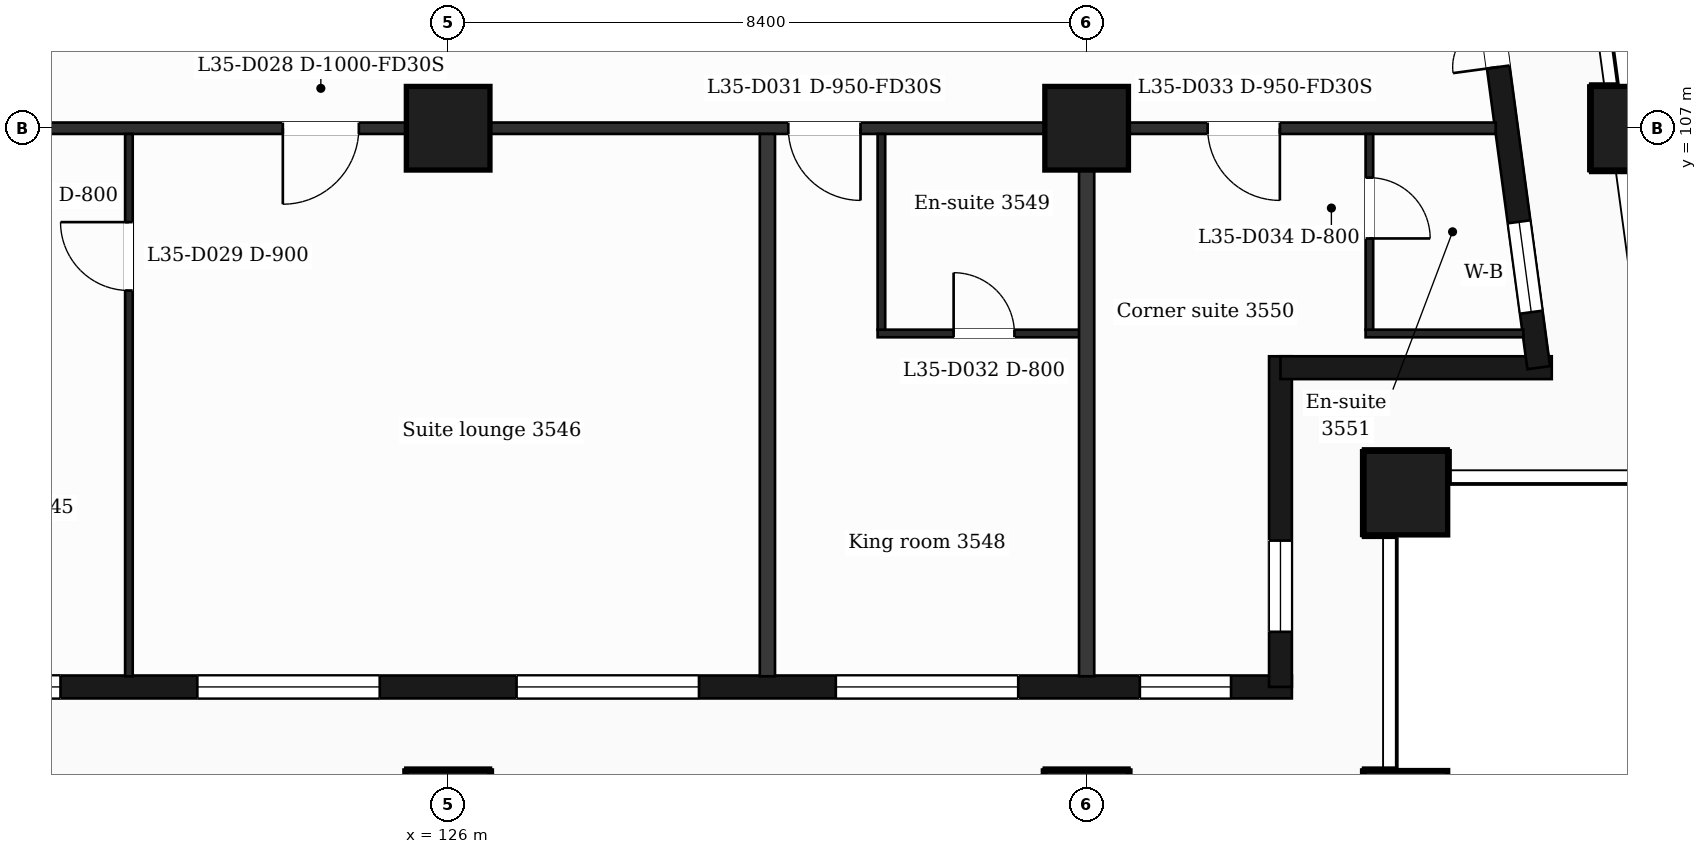
"""IFC4 building model, lengths in metres.
Left out: names, types, materials, properties, quantities, classifications, styles, units other than length and angle.
Written with IfcOpenShell. Run it as: python <this file> out.ifc"""

import sys

from ifc_helpers import new_model, si_unit, direction, frame, frame_2d, origin, origin_2d, place, context, subcontext, project, spatial, rectangle, extrude, element, fill, save


model = new_model("IFC4")
c1 = context("Model", 3, precision=1e-05, world=origin(), true_north=direction((0.0, 1.0)))
c2 = subcontext(c1, "Body", "Model", "MODEL_VIEW")
j1 = project(units=[si_unit("LENGTHUNIT", "METRE"), si_unit("PLANEANGLEUNIT", "RADIAN")], contexts=[c1])
p1 = place(None, origin())
s1 = spatial("IfcSite", under=j1, at=p1, CompositionType="ELEMENT")
p2 = place(p1, origin())
s2 = spatial("IfcBuilding", under=s1, at=p2, CompositionType="ELEMENT")
p3 = place(p2, frame((0.0, 0.0, 151.5)))
s3 = spatial("IfcBuildingStorey", under=s2, at=p3, CompositionType="ELEMENT", Elevation=151.5)
for number, where, z_axis, x_axis in (
    (1, (126.0, 98.0, 0.0), (0.0, 0.0, 1.0), (1.0, 0.0, 0.0)),
    (2, (134.4, 98.0, 0.0), (0.0, 0.0, 1.0), (1.0, 0.0, 0.0)),
    (3, (138.6, 98.0, 0.0), (0.0, 0.0, 1.0), (1.0, 0.0, 0.0)),
    (4, (138.6, 102.2, 0.0), (0.0, 0.0, 1.0), (1.0, 0.0, 0.0)),
    (5, (126.0, 107.0, 0.0), (0.0, 0.0, 1.0), (1.0, 0.0, 0.0)),
    (6, (134.4, 107.0, 0.0), (0.0, 0.0, 1.0), (1.0, 0.0, 0.0)),
    (7, (141.588, 107.0, 0.0), (0.0, 0.0, 1.0), (1.0, 0.0, 0.0)),
):
    element("IfcColumn", number, at=place(p3, frame(where, z_axis=z_axis, x_axis=x_axis)), inside=s3, PredefinedType="COLUMN", context=c2, shape_type="SweptSolid", body=[
        extrude(rectangle(XDim=1.1, YDim=1.1, at=origin_2d()), origin(), (0.0, 0.0, 1.0), 3.7),
    ])
p4 = place(p3, frame((89.85, 99.65, 0.0), z_axis=(0.0, 0.0, 1.0), x_axis=(1.0, 0.0, 0.0)))
e8 = element("IfcWall", 8, at=p4, inside=s3, PredefinedType="SOLIDWALL", context=c2, shape_type="SweptSolid", body=[
    extrude(rectangle(XDim=47.25, YDim=0.3, at=frame_2d((23.625, 0.0))), origin(), (0.0, 0.0, 1.0), 3.38),
])
p5 = place(p4, frame((0.725, 0.0, 0.9)))
e9 = element("IfcOpeningElement", 9, at=p5, cuts=e8, PredefinedType="OPENING", context=c2, shape_type="SweptSolid", body=[
    extrude(rectangle(XDim=1.2, YDim=2.1, at=frame_2d((0.6, 1.05))), frame((0.0, 0.16, 0.0), z_axis=(0.0, -1.0, 0.0), x_axis=(1.0, 0.0, 0.0)), (0.0, 0.0, 1.0), 0.32),
])
p6 = place(p4, frame((3.45, 0.0, 0.9)))
e10 = element("IfcOpeningElement", 10, at=p6, cuts=e8, PredefinedType="OPENING", context=c2, shape_type="SweptSolid", body=[
    extrude(rectangle(XDim=2.4, YDim=2.1, at=frame_2d((1.2, 1.05))), frame((0.0, 0.16, 0.0), z_axis=(0.0, -1.0, 0.0), x_axis=(1.0, 0.0, 0.0)), (0.0, 0.0, 1.0), 0.32),
])
p7 = place(p4, frame((7.35, 0.0, 0.0)))
e11 = element("IfcOpeningElement", 11, at=p7, cuts=e8, PredefinedType="OPENING", context=c2, shape_type="SweptSolid", body=[
    extrude(rectangle(XDim=1.2, YDim=2.4, at=frame_2d((0.6, 1.2))), frame((0.0, 0.16, 0.0), z_axis=(0.0, -1.0, 0.0), x_axis=(1.0, 0.0, 0.0)), (0.0, 0.0, 1.0), 0.32),
])
p8 = place(p4, frame((9.15, 0.0, 0.9)))
e12 = element("IfcOpeningElement", 12, at=p8, cuts=e8, PredefinedType="OPENING", context=c2, shape_type="SweptSolid", body=[
    extrude(rectangle(XDim=1.2, YDim=2.1, at=frame_2d((0.6, 1.05))), frame((0.0, 0.16, 0.0), z_axis=(0.0, -1.0, 0.0), x_axis=(1.0, 0.0, 0.0)), (0.0, 0.0, 1.0), 0.32),
])
p9 = place(p4, frame((11.85, 0.0, 0.9)))
e13 = element("IfcOpeningElement", 13, at=p9, cuts=e8, PredefinedType="OPENING", context=c2, shape_type="SweptSolid", body=[
    extrude(rectangle(XDim=2.4, YDim=2.1, at=frame_2d((1.2, 1.05))), frame((0.0, 0.16, 0.0), z_axis=(0.0, -1.0, 0.0), x_axis=(1.0, 0.0, 0.0)), (0.0, 0.0, 1.0), 0.32),
])
p10 = place(p4, frame((16.05, 0.0, 0.9)))
e14 = element("IfcOpeningElement", 14, at=p10, cuts=e8, PredefinedType="OPENING", context=c2, shape_type="SweptSolid", body=[
    extrude(rectangle(XDim=2.4, YDim=2.1, at=frame_2d((1.2, 1.05))), frame((0.0, 0.16, 0.0), z_axis=(0.0, -1.0, 0.0), x_axis=(1.0, 0.0, 0.0)), (0.0, 0.0, 1.0), 0.32),
])
p11 = place(p4, frame((20.85, 0.0, 0.9)))
e15 = element("IfcOpeningElement", 15, at=p11, cuts=e8, PredefinedType="OPENING", context=c2, shape_type="SweptSolid", body=[
    extrude(rectangle(XDim=1.2, YDim=2.1, at=frame_2d((0.6, 1.05))), frame((0.0, 0.16, 0.0), z_axis=(0.0, -1.0, 0.0), x_axis=(1.0, 0.0, 0.0)), (0.0, 0.0, 1.0), 0.32),
])
p12 = place(p4, frame((25.05, 0.0, 0.9)))
e16 = element("IfcOpeningElement", 16, at=p12, cuts=e8, PredefinedType="OPENING", context=c2, shape_type="SweptSolid", body=[
    extrude(rectangle(XDim=1.2, YDim=2.1, at=frame_2d((0.6, 1.05))), frame((0.0, 0.16, 0.0), z_axis=(0.0, -1.0, 0.0), x_axis=(1.0, 0.0, 0.0)), (0.0, 0.0, 1.0), 0.32),
])
p13 = place(p4, frame((28.65, 0.0, 0.9)))
e17 = element("IfcOpeningElement", 17, at=p13, cuts=e8, PredefinedType="OPENING", context=c2, shape_type="SweptSolid", body=[
    extrude(rectangle(XDim=2.4, YDim=2.1, at=frame_2d((1.2, 1.05))), frame((0.0, 0.16, 0.0), z_axis=(0.0, -1.0, 0.0), x_axis=(1.0, 0.0, 0.0)), (0.0, 0.0, 1.0), 0.32),
])
p14 = place(p4, frame((32.85, 0.0, 0.9)))
e18 = element("IfcOpeningElement", 18, at=p14, cuts=e8, PredefinedType="OPENING", context=c2, shape_type="SweptSolid", body=[
    extrude(rectangle(XDim=2.4, YDim=2.1, at=frame_2d((1.2, 1.05))), frame((0.0, 0.16, 0.0), z_axis=(0.0, -1.0, 0.0), x_axis=(1.0, 0.0, 0.0)), (0.0, 0.0, 1.0), 0.32),
])
p15 = place(p4, frame((37.05, 0.0, 0.9)))
e19 = element("IfcOpeningElement", 19, at=p15, cuts=e8, PredefinedType="OPENING", context=c2, shape_type="SweptSolid", body=[
    extrude(rectangle(XDim=2.4, YDim=2.1, at=frame_2d((1.2, 1.05))), frame((0.0, 0.16, 0.0), z_axis=(0.0, -1.0, 0.0), x_axis=(1.0, 0.0, 0.0)), (0.0, 0.0, 1.0), 0.32),
])
p16 = place(p4, frame((41.25, 0.0, 0.9)))
e20 = element("IfcOpeningElement", 20, at=p16, cuts=e8, PredefinedType="OPENING", context=c2, shape_type="SweptSolid", body=[
    extrude(rectangle(XDim=2.4, YDim=2.1, at=frame_2d((1.2, 1.05))), frame((0.0, 0.16, 0.0), z_axis=(0.0, -1.0, 0.0), x_axis=(1.0, 0.0, 0.0)), (0.0, 0.0, 1.0), 0.32),
])
p17 = place(p4, frame((45.25, 0.0, 0.9)))
e21 = element("IfcOpeningElement", 21, at=p17, cuts=e8, PredefinedType="OPENING", context=c2, shape_type="SweptSolid", body=[
    extrude(rectangle(XDim=1.2, YDim=2.1, at=frame_2d((0.6, 1.05))), frame((0.0, 0.16, 0.0), z_axis=(0.0, -1.0, 0.0), x_axis=(1.0, 0.0, 0.0)), (0.0, 0.0, 1.0), 0.32),
])
p18 = place(p3, frame((136.95, 99.65, 0.0), z_axis=(0.0, 0.0, 1.0), x_axis=(0.0, 1.0, 0.0)))
e22 = element("IfcWall", 22, at=p18, inside=s3, PredefinedType="SOLIDWALL", context=c2, shape_type="SweptSolid", body=[
    extrude(rectangle(XDim=4.35, YDim=0.3, at=frame_2d((2.175, 0.0))), origin(), (0.0, 0.0, 1.0), 3.38),
])
p19 = place(p18, frame((0.725, 0.0, 0.9)))
e23 = element("IfcOpeningElement", 23, at=p19, cuts=e22, PredefinedType="OPENING", context=c2, shape_type="SweptSolid", body=[
    extrude(rectangle(XDim=1.2, YDim=2.1, at=frame_2d((0.6, 1.05))), frame((0.0, 0.16, 0.0), z_axis=(0.0, -1.0, 0.0), x_axis=(1.0, 0.0, 0.0)), (0.0, 0.0, 1.0), 0.32),
])
p20 = place(p3, frame((136.95, 103.85, 0.0), z_axis=(0.0, 0.0, 1.0), x_axis=(1.0, 0.0, 0.0)))
e24 = element("IfcWall", 24, at=p20, inside=s3, PredefinedType="SOLIDWALL", context=c2, shape_type="SweptSolid", body=[
    extrude(rectangle(XDim=3.569, YDim=0.3, at=frame_2d((1.785, 0.0))), origin(), (0.0, 0.0, 1.0), 3.38),
])
p21 = place(p3, frame((140.348, 103.85, 0.0), z_axis=(0.0, 0.0, 1.0), x_axis=(-0.133431549479, 0.991058031401, 0.0)))
e25 = element("IfcWall", 25, at=p21, inside=s3, PredefinedType="SOLIDWALL", context=c2, shape_type="SweptSolid", body=[
    extrude(rectangle(XDim=6.609, YDim=0.3, at=frame_2d((3.304, 0.0))), origin(), (0.0, 0.0, 1.0), 3.38),
])
p22 = place(p21, frame((0.737, 0.0, 0.9)))
e26 = element("IfcOpeningElement", 26, at=p22, cuts=e25, PredefinedType="OPENING", context=c2, shape_type="SweptSolid", body=[
    extrude(rectangle(XDim=1.2, YDim=2.1, at=frame_2d((0.6, 1.05))), frame((0.0, 0.16, 0.0), z_axis=(0.0, -1.0, 0.0), x_axis=(1.0, 0.0, 0.0)), (0.0, 0.0, 1.0), 0.32),
])
p23 = place(p21, frame((3.991, 0.0, 0.0)))
e27 = element("IfcOpeningElement", 27, at=p23, cuts=e25, PredefinedType="OPENING", context=c2, shape_type="SweptSolid", body=[
    extrude(rectangle(XDim=1.2, YDim=2.4, at=frame_2d((0.6, 1.2))), frame((0.0, 0.16, 0.0), z_axis=(0.0, -1.0, 0.0), x_axis=(1.0, 0.0, 0.0)), (0.0, 0.0, 1.0), 0.32),
])
p24 = place(p3, frame((131.65, 104.3, 0.0), z_axis=(0.0, 0.0, 1.0), x_axis=(1.0, 0.0, 0.0)))
e28 = element("IfcWall", 28, at=p24, inside=s3, PredefinedType="PARTITIONING", context=c2, shape_type="SweptSolid", body=[
    extrude(rectangle(XDim=2.75, YDim=0.1, at=frame_2d((1.375, 0.0))), origin(), (0.0, 0.0, 1.0), 3.38),
])
p25 = place(p24, frame((1.0, 0.0, 0.0)))
e29 = element("IfcOpeningElement", 29, at=p25, cuts=e28, PredefinedType="OPENING", context=c2, shape_type="SweptSolid", body=[
    extrude(rectangle(XDim=0.8, YDim=2.1, at=frame_2d((0.4, 1.05))), frame((0.0, 0.06, 0.0), z_axis=(0.0, -1.0, 0.0), x_axis=(1.0, 0.0, 0.0)), (0.0, 0.0, 1.0), 0.12),
])
p26 = place(p3, frame((138.07, 104.3, 0.0), z_axis=(0.0, 0.0, 1.0), x_axis=(1.0, 0.0, 0.0)))
e30 = element("IfcWall", 30, at=p26, inside=s3, PredefinedType="PARTITIONING", context=c2, shape_type="SweptSolid", body=[
    extrude(rectangle(XDim=2.076, YDim=0.1, at=frame_2d((1.038, 0.0))), origin(), (0.0, 0.0, 1.0), 3.38),
])
p27 = place(p3, frame((87.018, 107.0, 0.0), z_axis=(0.0, 0.0, 1.0), x_axis=(1.0, 0.0, 0.0)))
e31 = element("IfcWall", 31, at=p27, inside=s3, PredefinedType="PARTITIONING", context=c2, shape_type="SweptSolid", body=[
    extrude(rectangle(XDim=52.765, YDim=0.15, at=frame_2d((26.382, 0.0))), origin(), (0.0, 0.0, 1.0), 3.38),
])
p28 = place(p27, frame((0.707, 0.0, 0.0)))
e32 = element("IfcOpeningElement", 32, at=p28, cuts=e31, PredefinedType="OPENING", context=c2, shape_type="SweptSolid", body=[
    extrude(rectangle(XDim=0.95, YDim=2.1, at=frame_2d((0.475, 1.05))), frame((0.0, 0.085, 0.0), z_axis=(0.0, -1.0, 0.0), x_axis=(1.0, 0.0, 0.0)), (0.0, 0.0, 1.0), 0.17),
])
p29 = place(p27, frame((7.645, 0.0, 0.0)))
e33 = element("IfcOpeningElement", 33, at=p29, cuts=e31, PredefinedType="OPENING", context=c2, shape_type="SweptSolid", body=[
    extrude(rectangle(XDim=0.95, YDim=2.1, at=frame_2d((0.475, 1.05))), frame((0.0, 0.085, 0.0), z_axis=(0.0, -1.0, 0.0), x_axis=(1.0, 0.0, 0.0)), (0.0, 0.0, 1.0), 0.17),
])
p30 = place(p27, frame((12.067, 0.0, 0.0)))
e34 = element("IfcOpeningElement", 34, at=p30, cuts=e31, PredefinedType="OPENING", context=c2, shape_type="SweptSolid", body=[
    extrude(rectangle(XDim=0.95, YDim=2.1, at=frame_2d((0.475, 1.05))), frame((0.0, 0.085, 0.0), z_axis=(0.0, -1.0, 0.0), x_axis=(1.0, 0.0, 0.0)), (0.0, 0.0, 1.0), 0.17),
])
p31 = place(p27, frame((14.582, 0.0, 0.0)))
e35 = element("IfcOpeningElement", 35, at=p31, cuts=e31, PredefinedType="OPENING", context=c2, shape_type="SweptSolid", body=[
    extrude(rectangle(XDim=0.95, YDim=2.1, at=frame_2d((0.475, 1.05))), frame((0.0, 0.085, 0.0), z_axis=(0.0, -1.0, 0.0), x_axis=(1.0, 0.0, 0.0)), (0.0, 0.0, 1.0), 0.17),
])
p32 = place(p27, frame((20.432, 0.0, 0.0)))
e36 = element("IfcOpeningElement", 36, at=p32, cuts=e31, PredefinedType="OPENING", context=c2, shape_type="SweptSolid", body=[
    extrude(rectangle(XDim=0.95, YDim=2.1, at=frame_2d((0.475, 1.05))), frame((0.0, 0.085, 0.0), z_axis=(0.0, -1.0, 0.0), x_axis=(1.0, 0.0, 0.0)), (0.0, 0.0, 1.0), 0.17),
])
p33 = place(p27, frame((23.532, 0.0, 0.0)))
e37 = element("IfcOpeningElement", 37, at=p33, cuts=e31, PredefinedType="OPENING", context=c2, shape_type="SweptSolid", body=[
    extrude(rectangle(XDim=1.0, YDim=2.1, at=frame_2d((0.5, 1.05))), frame((0.0, 0.085, 0.0), z_axis=(0.0, -1.0, 0.0), x_axis=(1.0, 0.0, 0.0)), (0.0, 0.0, 1.0), 0.17),
])
p34 = place(p27, frame((36.807, 0.0, 0.0)))
e38 = element("IfcOpeningElement", 38, at=p34, cuts=e31, PredefinedType="OPENING", context=c2, shape_type="SweptSolid", body=[
    extrude(rectangle(XDim=1.0, YDim=2.1, at=frame_2d((0.5, 1.05))), frame((0.0, 0.085, 0.0), z_axis=(0.0, -1.0, 0.0), x_axis=(1.0, 0.0, 0.0)), (0.0, 0.0, 1.0), 0.17),
])
p35 = place(p27, frame((43.457, 0.0, 0.0)))
e39 = element("IfcOpeningElement", 39, at=p35, cuts=e31, PredefinedType="OPENING", context=c2, shape_type="SweptSolid", body=[
    extrude(rectangle(XDim=0.95, YDim=2.1, at=frame_2d((0.475, 1.05))), frame((0.0, 0.085, 0.0), z_axis=(0.0, -1.0, 0.0), x_axis=(1.0, 0.0, 0.0)), (0.0, 0.0, 1.0), 0.17),
])
p36 = place(p27, frame((48.974, 0.0, 0.0)))
e40 = element("IfcOpeningElement", 40, at=p36, cuts=e31, PredefinedType="OPENING", context=c2, shape_type="SweptSolid", body=[
    extrude(rectangle(XDim=0.95, YDim=2.1, at=frame_2d((0.475, 1.05))), frame((0.0, 0.085, 0.0), z_axis=(0.0, -1.0, 0.0), x_axis=(1.0, 0.0, 0.0)), (0.0, 0.0, 1.0), 0.17),
])
p37 = place(p3, frame((121.8, 99.79, 0.0), z_axis=(0.0, 0.0, 1.0), x_axis=(0.0, 1.0, 0.0)))
e41 = element("IfcWall", 41, at=p37, inside=s3, PredefinedType="PARTITIONING", context=c2, shape_type="SweptSolid", body=[
    extrude(rectangle(XDim=7.135, YDim=0.1, at=frame_2d((3.567, 0.0))), origin(), (0.0, 0.0, 1.0), 3.38),
])
p38 = place(p37, frame((5.075, 0.0, 0.0)))
e42 = element("IfcOpeningElement", 42, at=p38, cuts=e41, PredefinedType="OPENING", context=c2, shape_type="SweptSolid", body=[
    extrude(rectangle(XDim=0.9, YDim=2.1, at=frame_2d((0.45, 1.05))), frame((0.0, 0.06, 0.0), z_axis=(0.0, -1.0, 0.0), x_axis=(1.0, 0.0, 0.0)), (0.0, 0.0, 1.0), 0.12),
])
p39 = place(p3, frame((130.2, 99.79, 0.0), z_axis=(0.0, 0.0, 1.0), x_axis=(0.0, 1.0, 0.0)))
e43 = element("IfcWall", 43, at=p39, inside=s3, PredefinedType="PARTITIONING", context=c2, shape_type="SweptSolid", body=[
    extrude(rectangle(XDim=7.135, YDim=0.2, at=frame_2d((3.567, 0.0))), origin(), (0.0, 0.0, 1.0), 3.38),
])
p40 = place(p3, frame((131.7, 104.35, 0.0), z_axis=(0.0, 0.0, 1.0), x_axis=(0.0, 1.0, 0.0)))
e44 = element("IfcWall", 44, at=p40, inside=s3, PredefinedType="PARTITIONING", context=c2, shape_type="SweptSolid", body=[
    extrude(rectangle(XDim=2.575, YDim=0.1, at=frame_2d((1.288, 0.0))), origin(), (0.0, 0.0, 1.0), 3.38),
])
p41 = place(p3, frame((134.4, 99.79, 0.0), z_axis=(0.0, 0.0, 1.0), x_axis=(0.0, 1.0, 0.0)))
e45 = element("IfcWall", 45, at=p41, inside=s3, PredefinedType="PARTITIONING", context=c2, shape_type="SweptSolid", body=[
    extrude(rectangle(XDim=7.135, YDim=0.2, at=frame_2d((3.567, 0.0))), origin(), (0.0, 0.0, 1.0), 3.38),
])
p42 = place(p3, frame((138.12, 104.35, 0.0), z_axis=(0.0, 0.0, 1.0), x_axis=(0.0, 1.0, 0.0)))
e46 = element("IfcWall", 46, at=p42, inside=s3, PredefinedType="PARTITIONING", context=c2, shape_type="SweptSolid", body=[
    extrude(rectangle(XDim=2.575, YDim=0.1, at=frame_2d((1.288, 0.0))), origin(), (0.0, 0.0, 1.0), 3.38),
])
p43 = place(p42, frame((1.2, 0.0, 0.0)))
e47 = element("IfcOpeningElement", 47, at=p43, cuts=e46, PredefinedType="OPENING", context=c2, shape_type="SweptSolid", body=[
    extrude(rectangle(XDim=0.8, YDim=2.1, at=frame_2d((0.4, 1.05))), frame((0.0, 0.06, 0.0), z_axis=(0.0, -1.0, 0.0), x_axis=(1.0, 0.0, 0.0)), (0.0, 0.0, 1.0), 0.12),
])
p44 = place(p13, origin())
e48 = element("IfcWindow", 48, at=p44, inside=s3, PartitioningType="SINGLE_PANEL", PredefinedType="WINDOW", context=c2, shape_type="SweptSolid", body=[
    extrude(rectangle(XDim=2.4, YDim=2.1, at=frame_2d((1.2, 1.05))), frame((0.0, 0.03, 0.0), z_axis=(0.0, -1.0, 0.0), x_axis=(1.0, 0.0, 0.0)), (0.0, 0.0, 1.0), 0.06),
])
fill(e17, e48)
p45 = place(p14, origin())
e49 = element("IfcWindow", 49, at=p45, inside=s3, PartitioningType="SINGLE_PANEL", PredefinedType="WINDOW", context=c2, shape_type="SweptSolid", body=[
    extrude(rectangle(XDim=2.4, YDim=2.1, at=frame_2d((1.2, 1.05))), frame((0.0, 0.03, 0.0), z_axis=(0.0, -1.0, 0.0), x_axis=(1.0, 0.0, 0.0)), (0.0, 0.0, 1.0), 0.06),
])
fill(e18, e49)
p46 = place(p15, origin())
e50 = element("IfcWindow", 50, at=p46, inside=s3, PartitioningType="SINGLE_PANEL", PredefinedType="WINDOW", context=c2, shape_type="SweptSolid", body=[
    extrude(rectangle(XDim=2.4, YDim=2.1, at=frame_2d((1.2, 1.05))), frame((0.0, 0.03, 0.0), z_axis=(0.0, -1.0, 0.0), x_axis=(1.0, 0.0, 0.0)), (0.0, 0.0, 1.0), 0.06),
])
fill(e19, e50)
p47 = place(p16, origin())
e51 = element("IfcWindow", 51, at=p47, inside=s3, PartitioningType="SINGLE_PANEL", PredefinedType="WINDOW", context=c2, shape_type="SweptSolid", body=[
    extrude(rectangle(XDim=2.4, YDim=2.1, at=frame_2d((1.2, 1.05))), frame((0.0, 0.03, 0.0), z_axis=(0.0, -1.0, 0.0), x_axis=(1.0, 0.0, 0.0)), (0.0, 0.0, 1.0), 0.06),
])
fill(e20, e51)
p48 = place(p17, origin())
e52 = element("IfcWindow", 52, at=p48, inside=s3, PartitioningType="SINGLE_PANEL", PredefinedType="WINDOW", context=c2, shape_type="SweptSolid", body=[
    extrude(rectangle(XDim=1.2, YDim=2.1, at=frame_2d((0.6, 1.05))), frame((0.0, 0.03, 0.0), z_axis=(0.0, -1.0, 0.0), x_axis=(1.0, 0.0, 0.0)), (0.0, 0.0, 1.0), 0.06),
])
fill(e21, e52)
p49 = place(p19, origin())
e53 = element("IfcWindow", 53, at=p49, inside=s3, PartitioningType="SINGLE_PANEL", PredefinedType="WINDOW", context=c2, shape_type="SweptSolid", body=[
    extrude(rectangle(XDim=1.2, YDim=2.1, at=frame_2d((0.6, 1.05))), frame((0.0, 0.03, 0.0), z_axis=(0.0, -1.0, 0.0), x_axis=(1.0, 0.0, 0.0)), (0.0, 0.0, 1.0), 0.06),
])
fill(e23, e53)
p50 = place(p22, origin())
e54 = element("IfcWindow", 54, at=p50, inside=s3, PartitioningType="SINGLE_PANEL", PredefinedType="WINDOW", context=c2, shape_type="SweptSolid", body=[
    extrude(rectangle(XDim=1.2, YDim=2.1, at=frame_2d((0.6, 1.05))), frame((0.0, 0.03, 0.0), z_axis=(0.0, -1.0, 0.0), x_axis=(1.0, 0.0, 0.0)), (0.0, 0.0, 1.0), 0.06),
])
fill(e26, e54)
p51 = place(p23, origin())
e55 = element("IfcDoor", 55, at=p51, inside=s3, OperationType="DOUBLE_DOOR_SINGLE_SWING", PredefinedType="DOOR", context=c2, shape_type="SweptSolid", body=[
    extrude(rectangle(XDim=1.2, YDim=2.4, at=frame_2d((0.6, 1.2))), frame((0.0, 0.025, 0.0), z_axis=(0.0, -1.0, 0.0), x_axis=(1.0, 0.0, 0.0)), (0.0, 0.0, 1.0), 0.05),
])
fill(e27, e55)
p52 = place(p34, origin())
e56 = element("IfcDoor", 56, at=p52, inside=s3, OperationType="SINGLE_SWING_LEFT", PredefinedType="DOOR", context=c2, shape_type="SweptSolid", body=[
    extrude(rectangle(XDim=1.0, YDim=2.1, at=frame_2d((0.5, 1.05))), frame((0.0, 0.025, 0.0), z_axis=(0.0, -1.0, 0.0), x_axis=(1.0, 0.0, 0.0)), (0.0, 0.0, 1.0), 0.05),
])
fill(e38, e56)
p53 = place(p38, origin())
e57 = element("IfcDoor", 57, at=p53, inside=s3, OperationType="SINGLE_SWING_RIGHT", PredefinedType="DOOR", context=c2, shape_type="SweptSolid", body=[
    extrude(rectangle(XDim=0.9, YDim=2.1, at=frame_2d((0.45, 1.05))), frame((0.0, 0.025, 0.0), z_axis=(0.0, -1.0, 0.0), x_axis=(1.0, 0.0, 0.0)), (0.0, 0.0, 1.0), 0.05),
])
fill(e42, e57)
p54 = place(p35, origin())
e58 = element("IfcDoor", 58, at=p54, inside=s3, OperationType="SINGLE_SWING_RIGHT", PredefinedType="DOOR", context=c2, shape_type="SweptSolid", body=[
    extrude(rectangle(XDim=0.95, YDim=2.1, at=frame_2d((0.475, 1.05))), frame((0.0, 0.025, 0.0), z_axis=(0.0, -1.0, 0.0), x_axis=(1.0, 0.0, 0.0)), (0.0, 0.0, 1.0), 0.05),
])
fill(e39, e58)
p55 = place(p25, origin())
e59 = element("IfcDoor", 59, at=p55, inside=s3, OperationType="SINGLE_SWING_LEFT", PredefinedType="DOOR", context=c2, shape_type="SweptSolid", body=[
    extrude(rectangle(XDim=0.8, YDim=2.1, at=frame_2d((0.4, 1.05))), frame((0.0, 0.025, 0.0), z_axis=(0.0, -1.0, 0.0), x_axis=(1.0, 0.0, 0.0)), (0.0, 0.0, 1.0), 0.05),
])
fill(e29, e59)
p56 = place(p36, origin())
e60 = element("IfcDoor", 60, at=p56, inside=s3, OperationType="SINGLE_SWING_RIGHT", PredefinedType="DOOR", context=c2, shape_type="SweptSolid", body=[
    extrude(rectangle(XDim=0.95, YDim=2.1, at=frame_2d((0.475, 1.05))), frame((0.0, 0.025, 0.0), z_axis=(0.0, -1.0, 0.0), x_axis=(1.0, 0.0, 0.0)), (0.0, 0.0, 1.0), 0.05),
])
fill(e40, e60)
p57 = place(p43, origin())
e61 = element("IfcDoor", 61, at=p57, inside=s3, OperationType="SINGLE_SWING_LEFT", PredefinedType="DOOR", context=c2, shape_type="SweptSolid", body=[
    extrude(rectangle(XDim=0.8, YDim=2.1, at=frame_2d((0.4, 1.05))), frame((0.0, 0.025, 0.0), z_axis=(0.0, -1.0, 0.0), x_axis=(1.0, 0.0, 0.0)), (0.0, 0.0, 1.0), 0.05),
])
fill(e47, e61)
save(model, sys.argv[1])
